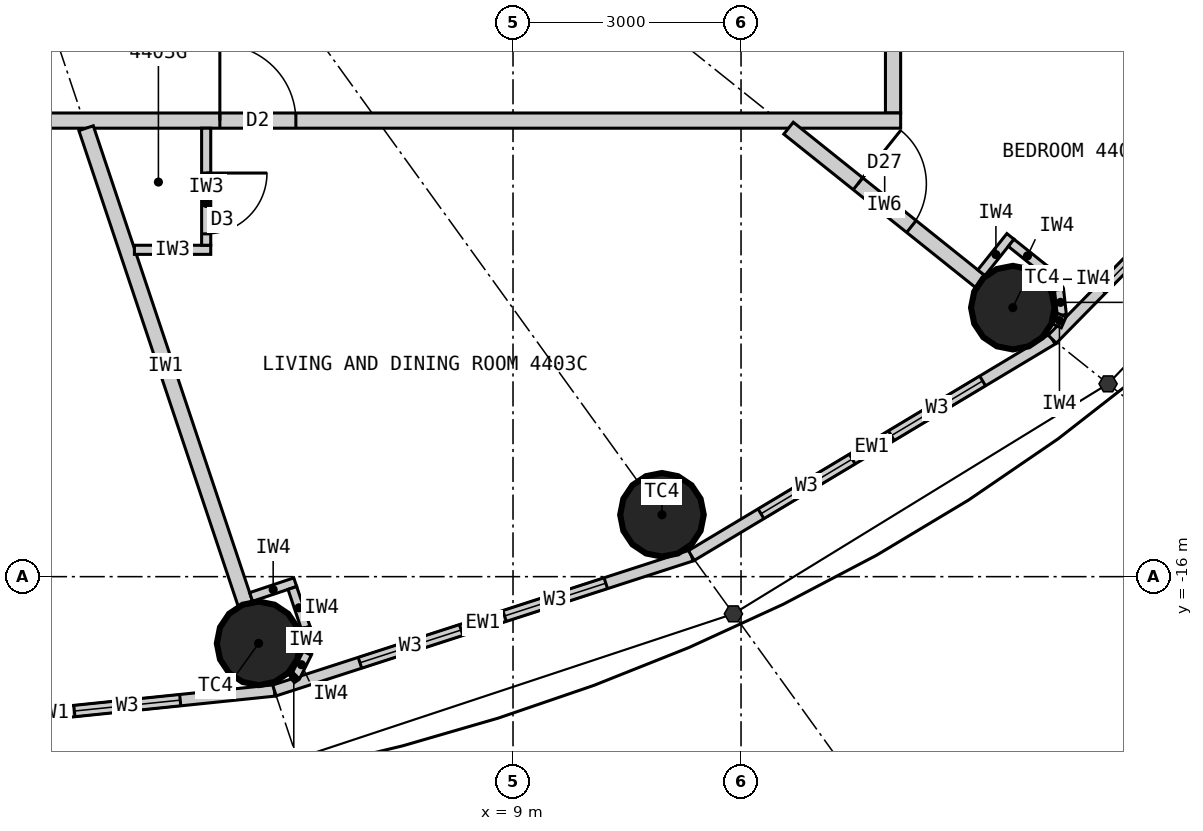
"""IFC4 building model, lengths in metres.
Left out: names, types, materials, properties, quantities, classifications, styles, units other than length and angle.
Written with IfcOpenShell. Run it as: python <this file> out.ifc"""

import sys

from ifc_helpers import new_model, si_unit, direction, frame, frame_2d, origin, origin_2d, place, context, subcontext, project, spatial, rectangle, circle, extrude, element, fill, save


model = new_model("IFC4")
c1 = context("Model", 3, precision=1e-05, world=origin(), true_north=direction((0.0, 1.0)))
c2 = subcontext(c1, "Body", "Model", "MODEL_VIEW")
j1 = project(units=[si_unit("LENGTHUNIT", "METRE"), si_unit("PLANEANGLEUNIT", "RADIAN")], contexts=[c1])
p1 = place(None, origin())
s1 = spatial("IfcSite", under=j1, at=p1, CompositionType="ELEMENT")
p2 = place(p1, origin())
s2 = spatial("IfcBuilding", under=s1, at=p2, CompositionType="ELEMENT")
p3 = place(p2, frame((0.0, 0.0, 166.5)))
s3 = spatial("IfcBuildingStorey", under=s2, at=p3, CompositionType="ELEMENT", Elevation=166.5)
for number, where, z_axis, x_axis in (
    (1, (5.653, -16.877, 0.0), (0.0, 0.0, 1.0), (1.0, 0.0, 0.0)),
    (2, (10.96, -15.186, 0.0), (0.0, 0.0, 1.0), (1.0, 0.0, 0.0)),
    (3, (15.576, -12.461, 0.0), (0.0, 0.0, 1.0), (1.0, 0.0, 0.0)),
):
    element("IfcColumn", number, at=place(p3, frame(where, z_axis=z_axis, x_axis=x_axis)), inside=s3, PredefinedType="COLUMN", context=c2, shape_type="SweptSolid", body=[
        extrude(circle(Radius=0.55, at=origin_2d()), origin(), (0.0, 0.0, 1.0), 3.3),
    ])
p4 = place(p3, frame((0.0, -18.1, 0.0), z_axis=(0.0, 0.0, 1.0), x_axis=(0.994751738032, 0.102318032045, 0.0)))
e4 = element("IfcWall", 4, at=p4, inside=s3, PredefinedType="ELEMENTEDWALL", context=c2, shape_type="SweptSolid", body=[
    extrude(rectangle(XDim=5.891, YDim=0.15, at=frame_2d((2.946, 0.0))), origin(), (0.0, 0.0, 1.0), 3.12),
])
p5 = place(p4, frame((1.246, 0.0, 0.9)))
e5 = element("IfcOpeningElement", 5, at=p5, cuts=e4, PredefinedType="OPENING", context=c2, shape_type="SweptSolid", body=[
    extrude(rectangle(XDim=1.4, YDim=1.9, at=frame_2d((0.7, 0.95))), frame((0.0, 0.085, 0.0), z_axis=(0.0, -1.0, 0.0), x_axis=(1.0, 0.0, 0.0)), (0.0, 0.0, 1.0), 0.17),
])
p6 = place(p4, frame((3.246, 0.0, 0.9)))
e6 = element("IfcOpeningElement", 6, at=p6, cuts=e4, PredefinedType="OPENING", context=c2, shape_type="SweptSolid", body=[
    extrude(rectangle(XDim=1.4, YDim=1.9, at=frame_2d((0.7, 0.95))), frame((0.0, 0.085, 0.0), z_axis=(0.0, -1.0, 0.0), x_axis=(1.0, 0.0, 0.0)), (0.0, 0.0, 1.0), 0.17),
])
p7 = place(p3, frame((5.86, -17.497, 0.0), z_axis=(0.0, 0.0, 1.0), x_axis=(0.951432482129, 0.307857486429, 0.0)))
e7 = element("IfcWall", 7, at=p7, inside=s3, PredefinedType="ELEMENTEDWALL", context=c2, shape_type="SweptSolid", body=[
    extrude(rectangle(XDim=5.766, YDim=0.15, at=frame_2d((2.883, 0.0))), origin(), (0.0, 0.0, 1.0), 3.12),
])
p8 = place(p7, frame((1.183, 0.0, 0.9)))
e8 = element("IfcOpeningElement", 8, at=p8, cuts=e7, PredefinedType="OPENING", context=c2, shape_type="SweptSolid", body=[
    extrude(rectangle(XDim=1.4, YDim=1.9, at=frame_2d((0.7, 0.95))), frame((0.0, 0.085, 0.0), z_axis=(0.0, -1.0, 0.0), x_axis=(1.0, 0.0, 0.0)), (0.0, 0.0, 1.0), 0.17),
])
p9 = place(p7, frame((3.183, 0.0, 0.9)))
e9 = element("IfcOpeningElement", 9, at=p9, cuts=e7, PredefinedType="OPENING", context=c2, shape_type="SweptSolid", body=[
    extrude(rectangle(XDim=1.4, YDim=1.9, at=frame_2d((0.7, 0.95))), frame((0.0, 0.085, 0.0), z_axis=(0.0, -1.0, 0.0), x_axis=(1.0, 0.0, 0.0)), (0.0, 0.0, 1.0), 0.17),
])
p10 = place(p3, frame((11.346, -15.722, 0.0), z_axis=(0.0, 0.0, 1.0), x_axis=(0.857695199231, 0.514158482587, 0.0)))
e10 = element("IfcWall", 10, at=p10, inside=s3, PredefinedType="ELEMENTEDWALL", context=c2, shape_type="SweptSolid", body=[
    extrude(rectangle(XDim=5.536, YDim=0.15, at=frame_2d((2.768, 0.0))), origin(), (0.0, 0.0, 1.0), 3.12),
])
p11 = place(p10, frame((1.068, 0.0, 0.9)))
e11 = element("IfcOpeningElement", 11, at=p11, cuts=e10, PredefinedType="OPENING", context=c2, shape_type="SweptSolid", body=[
    extrude(rectangle(XDim=1.4, YDim=1.9, at=frame_2d((0.7, 0.95))), frame((0.0, 0.085, 0.0), z_axis=(0.0, -1.0, 0.0), x_axis=(1.0, 0.0, 0.0)), (0.0, 0.0, 1.0), 0.17),
])
p12 = place(p10, frame((3.068, 0.0, 0.9)))
e12 = element("IfcOpeningElement", 12, at=p12, cuts=e10, PredefinedType="OPENING", context=c2, shape_type="SweptSolid", body=[
    extrude(rectangle(XDim=1.4, YDim=1.9, at=frame_2d((0.7, 0.95))), frame((0.0, 0.085, 0.0), z_axis=(0.0, -1.0, 0.0), x_axis=(1.0, 0.0, 0.0)), (0.0, 0.0, 1.0), 0.17),
])
p13 = place(p3, frame((16.095, -12.876, 0.0), z_axis=(0.0, 0.0, 1.0), x_axis=(0.700727467776, 0.71342905457, 0.0)))
e13 = element("IfcWall", 13, at=p13, inside=s3, PredefinedType="ELEMENTEDWALL", context=c2, shape_type="SweptSolid", body=[
    extrude(rectangle(XDim=5.247, YDim=0.15, at=frame_2d((2.624, 0.0))), origin(), (0.0, 0.0, 1.0), 3.12),
])
p14 = place(p13, frame((0.924, 0.0, 0.9)))
e14 = element("IfcOpeningElement", 14, at=p14, cuts=e13, PredefinedType="OPENING", context=c2, shape_type="SweptSolid", body=[
    extrude(rectangle(XDim=1.4, YDim=1.9, at=frame_2d((0.7, 0.95))), frame((0.0, 0.085, 0.0), z_axis=(0.0, -1.0, 0.0), x_axis=(1.0, 0.0, 0.0)), (0.0, 0.0, 1.0), 0.17),
])
p15 = place(p13, frame((2.924, 0.0, 0.9)))
e15 = element("IfcOpeningElement", 15, at=p15, cuts=e13, PredefinedType="OPENING", context=c2, shape_type="SweptSolid", body=[
    extrude(rectangle(XDim=1.4, YDim=1.9, at=frame_2d((0.7, 0.95))), frame((0.0, 0.085, 0.0), z_axis=(0.0, -1.0, 0.0), x_axis=(1.0, 0.0, 0.0)), (0.0, 0.0, 1.0), 0.17),
])
p16 = place(p3, frame((14.0, -9.9, 0.0), z_axis=(0.0, 0.0, 1.0), x_axis=(0.0, 1.0, 0.0)))
e16 = element("IfcWall", 16, at=p16, inside=s3, PredefinedType="PARTITIONING", context=c2, shape_type="SweptSolid", body=[
    extrude(rectangle(XDim=19.8, YDim=0.2, at=frame_2d((9.9, 0.0))), origin(), (0.0, 0.0, 1.0), 3.12),
])
p17 = place(p16, frame((3.688, 0.0, 0.0)))
e17 = element("IfcOpeningElement", 17, at=p17, cuts=e16, PredefinedType="OPENING", context=c2, shape_type="SweptSolid", body=[
    extrude(rectangle(XDim=1.0, YDim=2.2, at=frame_2d((0.5, 1.1))), frame((0.0, 0.11, 0.0), z_axis=(0.0, -1.0, 0.0), x_axis=(1.0, 0.0, 0.0)), (0.0, 0.0, 1.0), 0.22),
])
p18 = place(p16, frame((9.979, 0.0, 0.0)))
e18 = element("IfcOpeningElement", 18, at=p18, cuts=e16, PredefinedType="OPENING", context=c2, shape_type="SweptSolid", body=[
    extrude(rectangle(XDim=1.0, YDim=2.2, at=frame_2d((0.5, 1.1))), frame((0.0, 0.11, 0.0), z_axis=(0.0, -1.0, 0.0), x_axis=(1.0, 0.0, 0.0)), (0.0, 0.0, 1.0), 0.22),
])
p19 = place(p16, frame((17.122, 0.0, 0.0)))
e19 = element("IfcOpeningElement", 19, at=p19, cuts=e16, PredefinedType="OPENING", context=c2, shape_type="SweptSolid", body=[
    extrude(rectangle(XDim=1.0, YDim=2.2, at=frame_2d((0.5, 1.1))), frame((0.0, 0.11, 0.0), z_axis=(0.0, -1.0, 0.0), x_axis=(1.0, 0.0, 0.0)), (0.0, 0.0, 1.0), 0.22),
])
p20 = place(p3, frame((14.1, -10.0, 0.0), z_axis=(0.0, 0.0, 1.0), x_axis=(-1.0, 0.0, 0.0)))
e20 = element("IfcWall", 20, at=p20, inside=s3, PredefinedType="PARTITIONING", context=c2, shape_type="SweptSolid", body=[
    extrude(rectangle(XDim=28.2, YDim=0.2, at=frame_2d((14.1, 0.0))), origin(), (0.0, 0.0, 1.0), 3.12),
])
p21 = place(p20, frame((23.165, 0.0, 0.0)))
e21 = element("IfcOpeningElement", 21, at=p21, cuts=e20, PredefinedType="OPENING", context=c2, shape_type="SweptSolid", body=[
    extrude(rectangle(XDim=1.0, YDim=2.2, at=frame_2d((0.5, 1.1))), frame((0.0, 0.11, 0.0), z_axis=(0.0, -1.0, 0.0), x_axis=(1.0, 0.0, 0.0)), (0.0, 0.0, 1.0), 0.22),
])
p22 = place(p20, frame((13.923, 0.0, 0.0)))
e22 = element("IfcOpeningElement", 22, at=p22, cuts=e20, PredefinedType="OPENING", context=c2, shape_type="SweptSolid", body=[
    extrude(rectangle(XDim=1.0, YDim=2.2, at=frame_2d((0.5, 1.1))), frame((0.0, 0.11, 0.0), z_axis=(0.0, -1.0, 0.0), x_axis=(1.0, 0.0, 0.0)), (0.0, 0.0, 1.0), 0.22),
])
p23 = place(p20, frame((7.957, 0.0, 0.0)))
e23 = element("IfcOpeningElement", 23, at=p23, cuts=e20, PredefinedType="OPENING", context=c2, shape_type="SweptSolid", body=[
    extrude(rectangle(XDim=1.0, YDim=2.2, at=frame_2d((0.5, 1.1))), frame((0.0, 0.11, 0.0), z_axis=(0.0, -1.0, 0.0), x_axis=(1.0, 0.0, 0.0)), (0.0, 0.0, 1.0), 0.22),
])
p24 = place(p3, frame((3.383, -10.1, 0.0), z_axis=(0.0, 0.0, 1.0), x_axis=(0.317615120474, -0.948219718866, 0.0)))
e24 = element("IfcWall", 24, at=p24, inside=s3, PredefinedType="PARTITIONING", context=c2, shape_type="SweptSolid", body=[
    extrude(rectangle(XDim=6.597, YDim=0.2, at=frame_2d((3.299, 0.0))), origin(), (0.0, 0.0, 1.0), 2.42),
])
p25 = place(p3, frame((12.625, -10.1, 0.0), z_axis=(0.0, 0.0, 1.0), x_axis=(0.780876185034, -0.624685827954, 0.0)))
e25 = element("IfcWall", 25, at=p25, inside=s3, PredefinedType="PARTITIONING", context=c2, shape_type="SweptSolid", body=[
    extrude(rectangle(XDim=3.229, YDim=0.2, at=frame_2d((1.615, 0.0))), origin(), (0.0, 0.0, 1.0), 2.42),
])
p26 = place(p25, frame((1.17, 0.0, 0.0)))
e26 = element("IfcOpeningElement", 26, at=p26, cuts=e25, PredefinedType="OPENING", context=c2, shape_type="SweptSolid", body=[
    extrude(rectangle(XDim=0.9, YDim=2.1, at=frame_2d((0.45, 1.05))), frame((0.0, 0.11, 0.0), z_axis=(0.0, -1.0, 0.0), x_axis=(1.0, 0.0, 0.0)), (0.0, 0.0, 1.0), 0.22),
])
p27 = place(p3, frame((4.019, -11.7, 0.0), z_axis=(0.0, 0.0, 1.0), x_axis=(1.0, 0.0, 0.0)))
e27 = element("IfcWall", 27, at=p27, inside=s3, PredefinedType="PARTITIONING", context=c2, shape_type="SweptSolid", body=[
    extrude(rectangle(XDim=1.004, YDim=0.12, at=frame_2d((0.502, 0.0))), origin(), (0.0, 0.0, 1.0), 3.12),
])
p28 = place(p3, frame((4.963, -10.1, 0.0), z_axis=(0.0, 0.0, 1.0), x_axis=(0.0, -1.0, 0.0)))
e28 = element("IfcWall", 28, at=p28, inside=s3, PredefinedType="PARTITIONING", context=c2, shape_type="SweptSolid", body=[
    extrude(rectangle(XDim=1.54, YDim=0.12, at=frame_2d((0.77, 0.0))), origin(), (0.0, 0.0, 1.0), 3.12),
])
p29 = place(p28, frame((0.59, 0.0, 0.0)))
e29 = element("IfcOpeningElement", 29, at=p29, cuts=e28, PredefinedType="OPENING", context=c2, shape_type="SweptSolid", body=[
    extrude(rectangle(XDim=0.8, YDim=2.1, at=frame_2d((0.4, 1.05))), frame((0.0, 0.07, 0.0), z_axis=(0.0, -1.0, 0.0), x_axis=(1.0, 0.0, 0.0)), (0.0, 0.0, 1.0), 0.14),
])
p30 = place(p3, frame((5.554, -16.267, 0.0), z_axis=(0.0, 0.0, 1.0), x_axis=(0.948163683492, 0.317782361541, 0.0)))
e30 = element("IfcWall", 30, at=p30, inside=s3, PredefinedType="PARTITIONING", context=c2, shape_type="SweptSolid", body=[
    extrude(rectangle(XDim=0.612, YDim=0.12, at=frame_2d((0.306, 0.0))), origin(), (0.0, 0.0, 1.0), 3.12),
])
p31 = place(p3, frame((6.097, -16.149, 0.0), z_axis=(0.0, 0.0, 1.0), x_axis=(0.317292604854, -0.948327687514, 0.0)))
e31 = element("IfcWall", 31, at=p31, inside=s3, PredefinedType="PARTITIONING", context=c2, shape_type="SweptSolid", body=[
    extrude(rectangle(XDim=0.55, YDim=0.12, at=frame_2d((0.275, 0.0))), origin(), (0.0, 0.0, 1.0), 3.12),
])
for number, where, z_axis, x_axis in (
    (32, (6.271, -16.67, 0.0), (0.0, 0.0, 1.0), (0.061, -0.998, 0.0)),
    (33, (6.292, -17.007, 0.0), (0.0, 0.0, 1.0), (-0.445, -0.895, 0.0)),
):
    element("IfcWall", number, at=place(p3, frame(where, z_axis=z_axis, x_axis=x_axis)), inside=s3, PredefinedType="PARTITIONING", context=c2, shape_type="SweptSolid", body=[
        extrude(rectangle(XDim=0.338, YDim=0.12, at=frame_2d((0.169, 0.0))), origin(), (0.0, 0.0, 1.0), 3.12),
    ])
p32 = place(p3, frame((6.142, -17.31, 0.0), z_axis=(0.0, 0.0, 1.0), x_axis=(-0.835039693181, -0.550189704386, 0.0)))
e34 = element("IfcWall", 34, at=p32, inside=s3, PredefinedType="PARTITIONING", context=c2, shape_type="SweptSolid", body=[
    extrude(rectangle(XDim=0.062, YDim=0.12, at=frame_2d((0.031, 0.0))), origin(), (0.0, 0.0, 1.0), 3.12),
])
p33 = place(p3, frame((15.162, -12.002, 0.0), z_axis=(0.0, 0.0, 1.0), x_axis=(0.624597762427, 0.780946627607, 0.0)))
e35 = element("IfcWall", 35, at=p33, inside=s3, PredefinedType="PARTITIONING", context=c2, shape_type="SweptSolid", body=[
    extrude(rectangle(XDim=0.612, YDim=0.12, at=frame_2d((0.306, 0.0))), origin(), (0.0, 0.0, 1.0), 3.12),
])
p34 = place(p3, frame((15.554, -11.608, 0.0), z_axis=(0.0, 0.0, 1.0), x_axis=(0.780695577787, -0.624911525597, 0.0)))
e36 = element("IfcWall", 36, at=p34, inside=s3, PredefinedType="PARTITIONING", context=c2, shape_type="SweptSolid", body=[
    extrude(rectangle(XDim=0.55, YDim=0.12, at=frame_2d((0.275, 0.0))), origin(), (0.0, 0.0, 1.0), 3.12),
])
p35 = place(p3, frame((15.984, -11.952, 0.0), z_axis=(0.0, 0.0, 1.0), x_axis=(0.592335221171, -0.805691619517, 0.0)))
e37 = element("IfcWall", 37, at=p35, inside=s3, PredefinedType="PARTITIONING", context=c2, shape_type="SweptSolid", body=[
    extrude(rectangle(XDim=0.338, YDim=0.12, at=frame_2d((0.169, 0.0))), origin(), (0.0, 0.0, 1.0), 3.12),
])
p36 = place(p3, frame((16.184, -12.224, 0.0), z_axis=(0.0, 0.0, 1.0), x_axis=(0.110669692975, -0.993857242795, 0.0)))
e38 = element("IfcWall", 38, at=p36, inside=s3, PredefinedType="PARTITIONING", context=c2, shape_type="SweptSolid", body=[
    extrude(rectangle(XDim=0.337, YDim=0.12, at=frame_2d((0.169, 0.0))), origin(), (0.0, 0.0, 1.0), 3.12),
])
p37 = place(p3, frame((16.221, -12.559, 0.0), z_axis=(0.0, 0.0, 1.0), x_axis=(-0.401064416249, -0.916049853457, 0.0)))
e39 = element("IfcWall", 39, at=p37, inside=s3, PredefinedType="PARTITIONING", context=c2, shape_type="SweptSolid", body=[
    extrude(rectangle(XDim=0.156, YDim=0.12, at=frame_2d((0.078, 0.0))), origin(), (0.0, 0.0, 1.0), 3.12),
])
p38 = place(p6, origin())
e40 = element("IfcWindow", 40, at=p38, inside=s3, PartitioningType="SINGLE_PANEL", PredefinedType="WINDOW", context=c2, shape_type="SweptSolid", body=[
    extrude(rectangle(XDim=1.4, YDim=1.9, at=frame_2d((0.7, 0.95))), frame((0.0, 0.03, 0.0), z_axis=(0.0, -1.0, 0.0), x_axis=(1.0, 0.0, 0.0)), (0.0, 0.0, 1.0), 0.06),
])
fill(e6, e40)
p39 = place(p8, origin())
e41 = element("IfcWindow", 41, at=p39, inside=s3, PartitioningType="SINGLE_PANEL", PredefinedType="WINDOW", context=c2, shape_type="SweptSolid", body=[
    extrude(rectangle(XDim=1.4, YDim=1.9, at=frame_2d((0.7, 0.95))), frame((0.0, 0.03, 0.0), z_axis=(0.0, -1.0, 0.0), x_axis=(1.0, 0.0, 0.0)), (0.0, 0.0, 1.0), 0.06),
])
fill(e8, e41)
p40 = place(p9, origin())
e42 = element("IfcWindow", 42, at=p40, inside=s3, PartitioningType="SINGLE_PANEL", PredefinedType="WINDOW", context=c2, shape_type="SweptSolid", body=[
    extrude(rectangle(XDim=1.4, YDim=1.9, at=frame_2d((0.7, 0.95))), frame((0.0, 0.03, 0.0), z_axis=(0.0, -1.0, 0.0), x_axis=(1.0, 0.0, 0.0)), (0.0, 0.0, 1.0), 0.06),
])
fill(e9, e42)
p41 = place(p11, origin())
e43 = element("IfcWindow", 43, at=p41, inside=s3, PartitioningType="SINGLE_PANEL", PredefinedType="WINDOW", context=c2, shape_type="SweptSolid", body=[
    extrude(rectangle(XDim=1.4, YDim=1.9, at=frame_2d((0.7, 0.95))), frame((0.0, 0.03, 0.0), z_axis=(0.0, -1.0, 0.0), x_axis=(1.0, 0.0, 0.0)), (0.0, 0.0, 1.0), 0.06),
])
fill(e11, e43)
p42 = place(p12, origin())
e44 = element("IfcWindow", 44, at=p42, inside=s3, PartitioningType="SINGLE_PANEL", PredefinedType="WINDOW", context=c2, shape_type="SweptSolid", body=[
    extrude(rectangle(XDim=1.4, YDim=1.9, at=frame_2d((0.7, 0.95))), frame((0.0, 0.03, 0.0), z_axis=(0.0, -1.0, 0.0), x_axis=(1.0, 0.0, 0.0)), (0.0, 0.0, 1.0), 0.06),
])
fill(e12, e44)
p43 = place(p14, origin())
e45 = element("IfcWindow", 45, at=p43, inside=s3, PartitioningType="SINGLE_PANEL", PredefinedType="WINDOW", context=c2, shape_type="SweptSolid", body=[
    extrude(rectangle(XDim=1.4, YDim=1.9, at=frame_2d((0.7, 0.95))), frame((0.0, 0.03, 0.0), z_axis=(0.0, -1.0, 0.0), x_axis=(1.0, 0.0, 0.0)), (0.0, 0.0, 1.0), 0.06),
])
fill(e14, e45)
p44 = place(p29, origin())
e46 = element("IfcDoor", 46, at=p44, inside=s3, OperationType="SINGLE_SWING_LEFT", PredefinedType="DOOR", context=c2, shape_type="SweptSolid", body=[
    extrude(rectangle(XDim=0.8, YDim=2.1, at=frame_2d((0.4, 1.05))), frame((0.0, 0.025, 0.0), z_axis=(0.0, -1.0, 0.0), x_axis=(1.0, 0.0, 0.0)), (0.0, 0.0, 1.0), 0.05),
])
fill(e29, e46)
p45 = place(p23, origin())
e47 = element("IfcDoor", 47, at=p45, inside=s3, OperationType="SINGLE_SWING_RIGHT", PredefinedType="DOOR", context=c2, shape_type="SweptSolid", body=[
    extrude(rectangle(XDim=1.0, YDim=2.2, at=frame_2d((0.5, 1.1))), frame((0.0, 0.025, 0.0), z_axis=(0.0, -1.0, 0.0), x_axis=(1.0, 0.0, 0.0)), (0.0, 0.0, 1.0), 0.05),
])
fill(e23, e47)
p46 = place(p26, origin())
e48 = element("IfcDoor", 48, at=p46, inside=s3, OperationType="SINGLE_SWING_LEFT", PredefinedType="DOOR", context=c2, shape_type="SweptSolid", body=[
    extrude(rectangle(XDim=0.9, YDim=2.1, at=frame_2d((0.45, 1.05))), frame((0.0, 0.025, 0.0), z_axis=(0.0, -1.0, 0.0), x_axis=(1.0, 0.0, 0.0)), (0.0, 0.0, 1.0), 0.05),
])
fill(e26, e48)
save(model, sys.argv[1])
